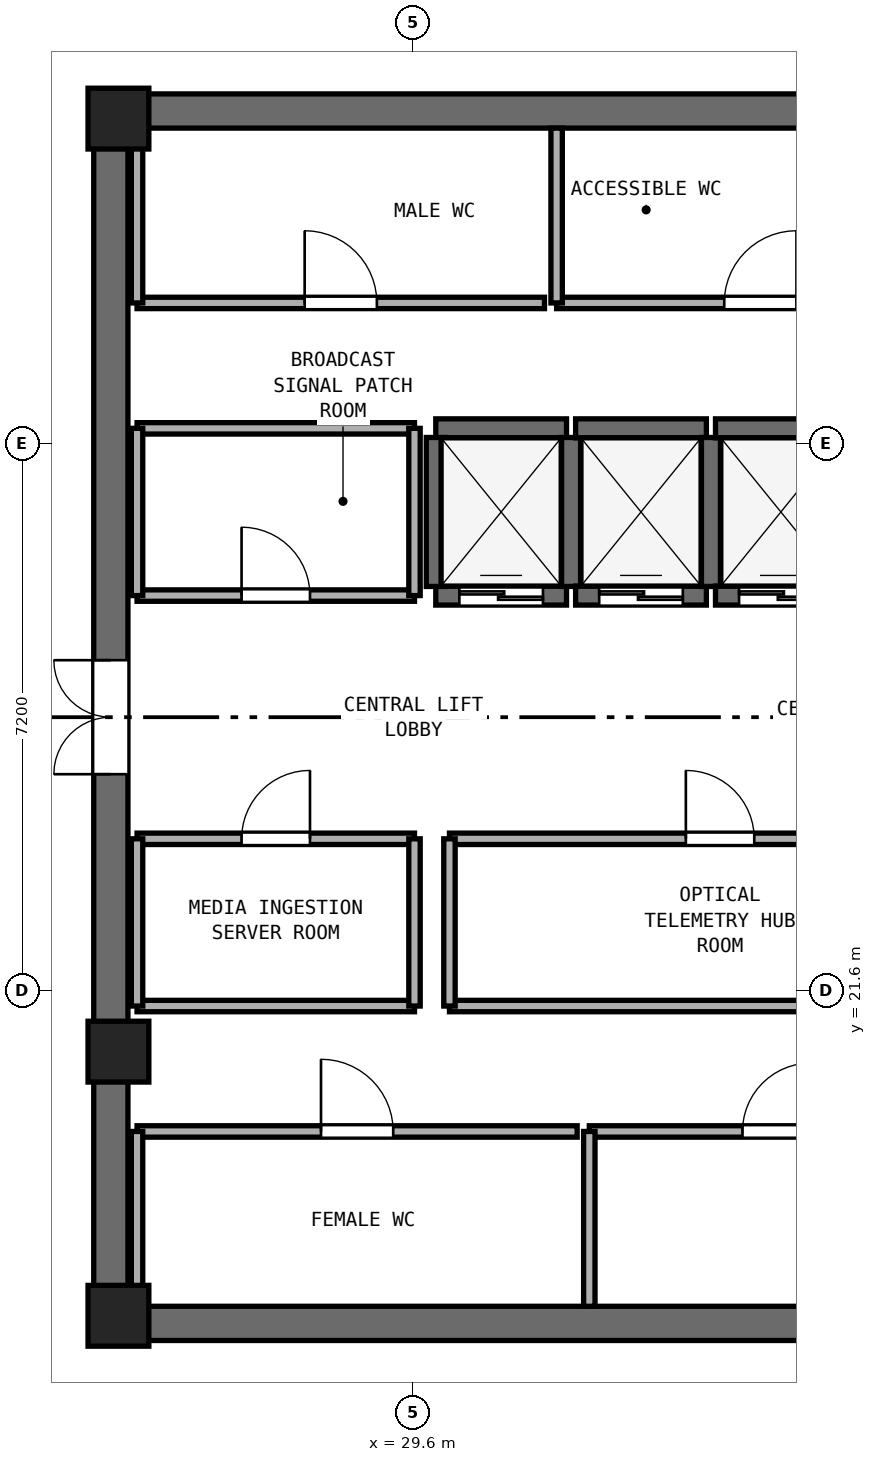
"""IFC4 building model, lengths in metres.
Left out: names, types, materials, properties, quantities, classifications, styles, units other than length and angle.
Written with IfcOpenShell. Run it as: python <this file> out.ifc"""

import sys

from ifc_helpers import new_model, si_unit, direction, frame, frame_2d, origin, origin_2d, place, context, subcontext, project, spatial, rectangle, extrude, element, fill, save


model = new_model("IFC4")
c1 = context("Model", 3, precision=1e-05, world=origin(), true_north=direction((0.0, 1.0)))
c2 = subcontext(c1, "Body", "Model", "MODEL_VIEW")
j1 = project(units=[si_unit("LENGTHUNIT", "METRE"), si_unit("PLANEANGLEUNIT", "RADIAN")], contexts=[c1])
p1 = place(None, origin())
s1 = spatial("IfcSite", under=j1, at=p1, CompositionType="ELEMENT")
p2 = place(p1, origin())
s2 = spatial("IfcBuilding", under=s1, at=p2, CompositionType="ELEMENT")
p3 = place(p2, frame((0.0, 0.0, 228.8)))
s3 = spatial("IfcBuildingStorey", under=s2, at=p3, CompositionType="ELEMENT", Elevation=228.8)
for number, where, z_axis, x_axis in (
    (1, (25.4, 17.225, 0.0), (0.0, 0.0, 1.0), (1.0, 0.0, 0.0)),
    (2, (25.4, 33.175, 0.0), (0.0, 0.0, 1.0), (1.0, 0.0, 0.0)),
):
    element("IfcWall", number, at=place(p3, frame(where, z_axis=z_axis, x_axis=x_axis)), inside=s3, PredefinedType="SHEAR", context=c2, shape_type="SweptSolid", body=[
        extrude(rectangle(XDim=23.2, YDim=0.45, at=frame_2d((11.6, 0.0))), origin(), (0.0, 0.0, 1.0), 3.51),
    ])
p4 = place(p3, frame((25.625, 17.45, 0.0), z_axis=(0.0, 0.0, 1.0), x_axis=(0.0, 1.0, 0.0)))
e3 = element("IfcWall", 3, at=p4, inside=s3, PredefinedType="SHEAR", context=c2, shape_type="SweptSolid", body=[
    extrude(rectangle(XDim=15.5, YDim=0.45, at=frame_2d((7.75, 0.0))), origin(), (0.0, 0.0, 1.0), 3.51),
])
p5 = place(p4, frame((7.0, 0.0, 0.0)))
e4 = element("IfcOpeningElement", 4, at=p5, cuts=e3, PredefinedType="OPENING", context=c2, shape_type="SweptSolid", body=[
    extrude(rectangle(XDim=1.5, YDim=2.15, at=frame_2d((0.75, 1.075))), frame((0.0, 0.235, 0.0), z_axis=(0.0, -1.0, 0.0), x_axis=(1.0, 0.0, 0.0)), (0.0, 0.0, 1.0), 0.47),
])
for number, where, z_axis, x_axis in (
    (5, (25.725, 17.325, 0.0), (0.0, 0.0, 1.0), (1.0, 0.0, 0.0)),
    (6, (25.725, 33.075, 0.0), (0.0, 0.0, 1.0), (1.0, 0.0, 0.0)),
    (7, (25.725, 20.8, 0.0), (0.0, 0.0, 1.0), (1.0, 0.0, 0.0)),
):
    element("IfcColumn", number, at=place(p3, frame(where, z_axis=z_axis, x_axis=x_axis)), inside=s3, PredefinedType="PILASTER", context=c2, shape_type="SweptSolid", body=[
        extrude(rectangle(XDim=0.8, YDim=0.8, at=origin_2d()), origin(), (0.0, 0.0, 1.0), 3.8),
    ])
p6 = place(p3, frame((29.9, 26.8, 0.0), z_axis=(0.0, 0.0, 1.0), x_axis=(1.0, 0.0, 0.0)))
e8 = element("IfcWall", 8, at=p6, inside=s3, PredefinedType="SHEAR", context=c2, shape_type="SweptSolid", body=[
    extrude(rectangle(XDim=1.72, YDim=0.25, at=frame_2d((0.86, 0.0))), origin(), (0.0, 0.0, 1.0), 3.51),
])
p7 = place(p6, frame((0.31, 0.0, 0.0)))
e9 = element("IfcOpeningElement", 9, at=p7, cuts=e8, PredefinedType="OPENING", context=c2, shape_type="SweptSolid", body=[
    extrude(rectangle(XDim=1.1, YDim=2.15, at=frame_2d((0.55, 1.075))), frame((0.0, 0.135, 0.0), z_axis=(0.0, -1.0, 0.0), x_axis=(1.0, 0.0, 0.0)), (0.0, 0.0, 1.0), 0.27),
])
p8 = place(p3, frame((29.9, 29.0, 0.0), z_axis=(0.0, 0.0, 1.0), x_axis=(1.0, 0.0, 0.0)))
e10 = element("IfcWall", 10, at=p8, inside=s3, PredefinedType="SHEAR", context=c2, shape_type="SweptSolid", body=[
    extrude(rectangle(XDim=1.72, YDim=0.25, at=frame_2d((0.86, 0.0))), origin(), (0.0, 0.0, 1.0), 3.51),
])
for number, where, z_axis, x_axis in (
    (11, (29.9, 26.92, 0.0), (0.0, 0.0, 1.0), (0.0, 1.0, 0.0)),
    (12, (31.68, 26.92, 0.0), (0.0, 0.0, 1.0), (0.0, 1.0, 0.0)),
):
    element("IfcWall", number, at=place(p3, frame(where, z_axis=z_axis, x_axis=x_axis)), inside=s3, PredefinedType="SHEAR", context=c2, shape_type="SweptSolid", body=[
        extrude(rectangle(XDim=1.96, YDim=0.25, at=frame_2d((0.98, 0.0))), origin(), (0.0, 0.0, 1.0), 3.51),
    ])
p9 = place(p3, frame((31.74, 26.8, 0.0), z_axis=(0.0, 0.0, 1.0), x_axis=(1.0, 0.0, 0.0)))
e13 = element("IfcWall", 13, at=p9, inside=s3, PredefinedType="SHEAR", context=c2, shape_type="SweptSolid", body=[
    extrude(rectangle(XDim=1.72, YDim=0.25, at=frame_2d((0.86, 0.0))), origin(), (0.0, 0.0, 1.0), 3.51),
])
p10 = place(p9, frame((0.31, 0.0, 0.0)))
e14 = element("IfcOpeningElement", 14, at=p10, cuts=e13, PredefinedType="OPENING", context=c2, shape_type="SweptSolid", body=[
    extrude(rectangle(XDim=1.1, YDim=2.15, at=frame_2d((0.55, 1.075))), frame((0.0, 0.135, 0.0), z_axis=(0.0, -1.0, 0.0), x_axis=(1.0, 0.0, 0.0)), (0.0, 0.0, 1.0), 0.27),
])
p11 = place(p3, frame((31.74, 29.0, 0.0), z_axis=(0.0, 0.0, 1.0), x_axis=(1.0, 0.0, 0.0)))
e15 = element("IfcWall", 15, at=p11, inside=s3, PredefinedType="SHEAR", context=c2, shape_type="SweptSolid", body=[
    extrude(rectangle(XDim=1.72, YDim=0.25, at=frame_2d((0.86, 0.0))), origin(), (0.0, 0.0, 1.0), 3.51),
])
p12 = place(p3, frame((33.52, 26.92, 0.0), z_axis=(0.0, 0.0, 1.0), x_axis=(0.0, 1.0, 0.0)))
e16 = element("IfcWall", 16, at=p12, inside=s3, PredefinedType="SHEAR", context=c2, shape_type="SweptSolid", body=[
    extrude(rectangle(XDim=1.96, YDim=0.25, at=frame_2d((0.98, 0.0))), origin(), (0.0, 0.0, 1.0), 3.51),
])
p13 = place(p3, frame((33.58, 26.8, 0.0), z_axis=(0.0, 0.0, 1.0), x_axis=(1.0, 0.0, 0.0)))
e17 = element("IfcWall", 17, at=p13, inside=s3, PredefinedType="SHEAR", context=c2, shape_type="SweptSolid", body=[
    extrude(rectangle(XDim=1.72, YDim=0.25, at=frame_2d((0.86, 0.0))), origin(), (0.0, 0.0, 1.0), 3.51),
])
p14 = place(p13, frame((0.31, 0.0, 0.0)))
e18 = element("IfcOpeningElement", 18, at=p14, cuts=e17, PredefinedType="OPENING", context=c2, shape_type="SweptSolid", body=[
    extrude(rectangle(XDim=1.1, YDim=2.15, at=frame_2d((0.55, 1.075))), frame((0.0, 0.135, 0.0), z_axis=(0.0, -1.0, 0.0), x_axis=(1.0, 0.0, 0.0)), (0.0, 0.0, 1.0), 0.27),
])
p15 = place(p3, frame((33.58, 29.0, 0.0), z_axis=(0.0, 0.0, 1.0), x_axis=(1.0, 0.0, 0.0)))
e19 = element("IfcWall", 19, at=p15, inside=s3, PredefinedType="SHEAR", context=c2, shape_type="SweptSolid", body=[
    extrude(rectangle(XDim=1.72, YDim=0.25, at=frame_2d((0.86, 0.0))), origin(), (0.0, 0.0, 1.0), 3.51),
])
p16 = place(p3, frame((25.97, 30.65, 0.0), z_axis=(0.0, 0.0, 1.0), x_axis=(1.0, 0.0, 0.0)))
e20 = element("IfcWall", 20, at=p16, inside=s3, PredefinedType="PARTITIONING", context=c2, shape_type="SweptSolid", body=[
    extrude(rectangle(XDim=5.36, YDim=0.15, at=frame_2d((2.68, 0.0))), origin(), (0.0, 0.0, 1.0), 3.51),
])
p17 = place(p16, frame((2.205, 0.0, 0.0)))
e21 = element("IfcOpeningElement", 21, at=p17, cuts=e20, PredefinedType="OPENING", context=c2, shape_type="SweptSolid", body=[
    extrude(rectangle(XDim=0.95, YDim=2.1, at=frame_2d((0.475, 1.05))), frame((0.0, 0.085, 0.0), z_axis=(0.0, -1.0, 0.0), x_axis=(1.0, 0.0, 0.0)), (0.0, 0.0, 1.0), 0.17),
])
p18 = place(p3, frame((25.97, 30.65, 0.0), z_axis=(0.0, 0.0, 1.0), x_axis=(0.0, 1.0, 0.0)))
e22 = element("IfcWall", 22, at=p18, inside=s3, PredefinedType="PARTITIONING", context=c2, shape_type="SweptSolid", body=[
    extrude(rectangle(XDim=2.3, YDim=0.15, at=frame_2d((1.15, 0.0))), origin(), (0.0, 0.0, 1.0), 2.61),
])
p19 = place(p3, frame((31.49, 30.65, 0.0), z_axis=(0.0, 0.0, 1.0), x_axis=(1.0, 0.0, 0.0)))
e23 = element("IfcWall", 23, at=p19, inside=s3, PredefinedType="PARTITIONING", context=c2, shape_type="SweptSolid", body=[
    extrude(rectangle(XDim=5.36, YDim=0.15, at=frame_2d((2.68, 0.0))), origin(), (0.0, 0.0, 1.0), 3.51),
])
p20 = place(p19, frame((2.205, 0.0, 0.0)))
e24 = element("IfcOpeningElement", 24, at=p20, cuts=e23, PredefinedType="OPENING", context=c2, shape_type="SweptSolid", body=[
    extrude(rectangle(XDim=0.95, YDim=2.1, at=frame_2d((0.475, 1.05))), frame((0.0, 0.085, 0.0), z_axis=(0.0, -1.0, 0.0), x_axis=(1.0, 0.0, 0.0)), (0.0, 0.0, 1.0), 0.17),
])
p21 = place(p3, frame((31.49, 30.65, 0.0), z_axis=(0.0, 0.0, 1.0), x_axis=(0.0, 1.0, 0.0)))
e25 = element("IfcWall", 25, at=p21, inside=s3, PredefinedType="PARTITIONING", context=c2, shape_type="SweptSolid", body=[
    extrude(rectangle(XDim=2.3, YDim=0.15, at=frame_2d((1.15, 0.0))), origin(), (0.0, 0.0, 1.0), 3.51),
])
p22 = place(p3, frame((25.97, 19.75, 0.0), z_axis=(0.0, 0.0, 1.0), x_axis=(1.0, 0.0, 0.0)))
e26 = element("IfcWall", 26, at=p22, inside=s3, PredefinedType="PARTITIONING", context=c2, shape_type="SweptSolid", body=[
    extrude(rectangle(XDim=5.79, YDim=0.15, at=frame_2d((2.895, 0.0))), origin(), (0.0, 0.0, 1.0), 3.51),
])
p23 = place(p22, frame((2.42, 0.0, 0.0)))
e27 = element("IfcOpeningElement", 27, at=p23, cuts=e26, PredefinedType="OPENING", context=c2, shape_type="SweptSolid", body=[
    extrude(rectangle(XDim=0.95, YDim=2.1, at=frame_2d((0.475, 1.05))), frame((0.0, 0.085, 0.0), z_axis=(0.0, -1.0, 0.0), x_axis=(1.0, 0.0, 0.0)), (0.0, 0.0, 1.0), 0.17),
])
p24 = place(p3, frame((25.97, 17.45, 0.0), z_axis=(0.0, 0.0, 1.0), x_axis=(0.0, 1.0, 0.0)))
e28 = element("IfcWall", 28, at=p24, inside=s3, PredefinedType="PARTITIONING", context=c2, shape_type="SweptSolid", body=[
    extrude(rectangle(XDim=2.3, YDim=0.15, at=frame_2d((1.15, 0.0))), origin(), (0.0, 0.0, 1.0), 2.61),
])
p25 = place(p3, frame((31.92, 19.75, 0.0), z_axis=(0.0, 0.0, 1.0), x_axis=(1.0, 0.0, 0.0)))
e29 = element("IfcWall", 29, at=p25, inside=s3, PredefinedType="PARTITIONING", context=c2, shape_type="SweptSolid", body=[
    extrude(rectangle(XDim=4.93, YDim=0.15, at=frame_2d((2.465, 0.0))), origin(), (0.0, 0.0, 1.0), 3.51),
])
p26 = place(p25, frame((2.015, 0.0, 0.0)))
e30 = element("IfcOpeningElement", 30, at=p26, cuts=e29, PredefinedType="OPENING", context=c2, shape_type="SweptSolid", body=[
    extrude(rectangle(XDim=0.9, YDim=2.1, at=frame_2d((0.45, 1.05))), frame((0.0, 0.085, 0.0), z_axis=(0.0, -1.0, 0.0), x_axis=(1.0, 0.0, 0.0)), (0.0, 0.0, 1.0), 0.17),
])
p27 = place(p3, frame((31.92, 17.45, 0.0), z_axis=(0.0, 0.0, 1.0), x_axis=(0.0, 1.0, 0.0)))
e31 = element("IfcWall", 31, at=p27, inside=s3, PredefinedType="PARTITIONING", context=c2, shape_type="SweptSolid", body=[
    extrude(rectangle(XDim=2.3, YDim=0.15, at=frame_2d((1.15, 0.0))), origin(), (0.0, 0.0, 1.0), 3.51),
])
p28 = place(p3, frame((25.97, 26.8, 0.0), z_axis=(0.0, 0.0, 1.0), x_axis=(1.0, 0.0, 0.0)))
e32 = element("IfcWall", 32, at=p28, inside=s3, PredefinedType="PARTITIONING", context=c2, shape_type="SweptSolid", body=[
    extrude(rectangle(XDim=3.65, YDim=0.15, at=frame_2d((1.825, 0.0))), origin(), (0.0, 0.0, 1.0), 3.51),
])
p29 = place(p28, frame((1.375, 0.0, 0.0)))
e33 = element("IfcOpeningElement", 33, at=p29, cuts=e32, PredefinedType="OPENING", context=c2, shape_type="SweptSolid", body=[
    extrude(rectangle(XDim=0.9, YDim=2.1, at=frame_2d((0.45, 1.05))), frame((0.0, 0.085, 0.0), z_axis=(0.0, -1.0, 0.0), x_axis=(1.0, 0.0, 0.0)), (0.0, 0.0, 1.0), 0.17),
])
p30 = place(p3, frame((25.97, 29.0, 0.0), z_axis=(0.0, 0.0, 1.0), x_axis=(1.0, 0.0, 0.0)))
e34 = element("IfcWall", 34, at=p30, inside=s3, PredefinedType="PARTITIONING", context=c2, shape_type="SweptSolid", body=[
    extrude(rectangle(XDim=3.65, YDim=0.15, at=frame_2d((1.825, 0.0))), origin(), (0.0, 0.0, 1.0), 3.51),
])
p31 = place(p3, frame((25.97, 26.8, 0.0), z_axis=(0.0, 0.0, 1.0), x_axis=(0.0, 1.0, 0.0)))
e35 = element("IfcWall", 35, at=p31, inside=s3, PredefinedType="PARTITIONING", context=c2, shape_type="SweptSolid", body=[
    extrude(rectangle(XDim=2.2, YDim=0.15, at=frame_2d((1.1, 0.0))), origin(), (0.0, 0.0, 1.0), 2.61),
])
p32 = place(p3, frame((29.62, 26.8, 0.0), z_axis=(0.0, 0.0, 1.0), x_axis=(0.0, 1.0, 0.0)))
e36 = element("IfcWall", 36, at=p32, inside=s3, PredefinedType="PARTITIONING", context=c2, shape_type="SweptSolid", body=[
    extrude(rectangle(XDim=2.2, YDim=0.15, at=frame_2d((1.1, 0.0))), origin(), (0.0, 0.0, 1.0), 3.51),
])
p33 = place(p3, frame((25.97, 21.4, 0.0), z_axis=(0.0, 0.0, 1.0), x_axis=(1.0, 0.0, 0.0)))
e37 = element("IfcWall", 37, at=p33, inside=s3, PredefinedType="PARTITIONING", context=c2, shape_type="SweptSolid", body=[
    extrude(rectangle(XDim=3.65, YDim=0.15, at=frame_2d((1.825, 0.0))), origin(), (0.0, 0.0, 1.0), 3.51),
])
p34 = place(p3, frame((25.97, 23.6, 0.0), z_axis=(0.0, 0.0, 1.0), x_axis=(1.0, 0.0, 0.0)))
e38 = element("IfcWall", 38, at=p34, inside=s3, PredefinedType="PARTITIONING", context=c2, shape_type="SweptSolid", body=[
    extrude(rectangle(XDim=3.65, YDim=0.15, at=frame_2d((1.825, 0.0))), origin(), (0.0, 0.0, 1.0), 3.51),
])
p35 = place(p34, frame((1.375, 0.0, 0.0)))
e39 = element("IfcOpeningElement", 39, at=p35, cuts=e38, PredefinedType="OPENING", context=c2, shape_type="SweptSolid", body=[
    extrude(rectangle(XDim=0.9, YDim=2.1, at=frame_2d((0.45, 1.05))), frame((0.0, 0.085, 0.0), z_axis=(0.0, -1.0, 0.0), x_axis=(1.0, 0.0, 0.0)), (0.0, 0.0, 1.0), 0.17),
])
p36 = place(p3, frame((25.97, 21.4, 0.0), z_axis=(0.0, 0.0, 1.0), x_axis=(0.0, 1.0, 0.0)))
e40 = element("IfcWall", 40, at=p36, inside=s3, PredefinedType="PARTITIONING", context=c2, shape_type="SweptSolid", body=[
    extrude(rectangle(XDim=2.2, YDim=0.15, at=frame_2d((1.1, 0.0))), origin(), (0.0, 0.0, 1.0), 2.61),
])
p37 = place(p3, frame((29.62, 21.4, 0.0), z_axis=(0.0, 0.0, 1.0), x_axis=(0.0, 1.0, 0.0)))
e41 = element("IfcWall", 41, at=p37, inside=s3, PredefinedType="PARTITIONING", context=c2, shape_type="SweptSolid", body=[
    extrude(rectangle(XDim=2.2, YDim=0.15, at=frame_2d((1.1, 0.0))), origin(), (0.0, 0.0, 1.0), 3.51),
])
p38 = place(p3, frame((30.08, 21.4, 0.0), z_axis=(0.0, 0.0, 1.0), x_axis=(1.0, 0.0, 0.0)))
e42 = element("IfcWall", 42, at=p38, inside=s3, PredefinedType="PARTITIONING", context=c2, shape_type="SweptSolid", body=[
    extrude(rectangle(XDim=7.12, YDim=0.15, at=frame_2d((3.56, 0.0))), origin(), (0.0, 0.0, 1.0), 3.51),
])
p39 = place(p3, frame((30.08, 23.6, 0.0), z_axis=(0.0, 0.0, 1.0), x_axis=(1.0, 0.0, 0.0)))
e43 = element("IfcWall", 43, at=p39, inside=s3, PredefinedType="PARTITIONING", context=c2, shape_type="SweptSolid", body=[
    extrude(rectangle(XDim=7.12, YDim=0.15, at=frame_2d((3.56, 0.0))), origin(), (0.0, 0.0, 1.0), 3.51),
])
p40 = place(p39, frame((3.11, 0.0, 0.0)))
e44 = element("IfcOpeningElement", 44, at=p40, cuts=e43, PredefinedType="OPENING", context=c2, shape_type="SweptSolid", body=[
    extrude(rectangle(XDim=0.9, YDim=2.1, at=frame_2d((0.45, 1.05))), frame((0.0, 0.085, 0.0), z_axis=(0.0, -1.0, 0.0), x_axis=(1.0, 0.0, 0.0)), (0.0, 0.0, 1.0), 0.17),
])
p41 = place(p3, frame((30.08, 21.4, 0.0), z_axis=(0.0, 0.0, 1.0), x_axis=(0.0, 1.0, 0.0)))
e45 = element("IfcWall", 45, at=p41, inside=s3, PredefinedType="PARTITIONING", context=c2, shape_type="SweptSolid", body=[
    extrude(rectangle(XDim=2.2, YDim=0.15, at=frame_2d((1.1, 0.0))), origin(), (0.0, 0.0, 1.0), 3.51),
])
p42 = place(p7, origin())
e46 = element("IfcDoor", 46, at=p42, inside=s3, OperationType="DOUBLE_DOOR_SLIDING", PredefinedType="DOOR", context=c2, shape_type="SweptSolid", body=[
    extrude(rectangle(XDim=1.1, YDim=2.15, at=frame_2d((0.55, 1.075))), frame((0.0, 0.025, 0.0), z_axis=(0.0, -1.0, 0.0), x_axis=(1.0, 0.0, 0.0)), (0.0, 0.0, 1.0), 0.05),
])
fill(e9, e46)
p43 = place(p10, origin())
e47 = element("IfcDoor", 47, at=p43, inside=s3, OperationType="DOUBLE_DOOR_SLIDING", PredefinedType="DOOR", context=c2, shape_type="SweptSolid", body=[
    extrude(rectangle(XDim=1.1, YDim=2.15, at=frame_2d((0.55, 1.075))), frame((0.0, 0.025, 0.0), z_axis=(0.0, -1.0, 0.0), x_axis=(1.0, 0.0, 0.0)), (0.0, 0.0, 1.0), 0.05),
])
fill(e14, e47)
p44 = place(p14, origin())
e48 = element("IfcDoor", 48, at=p44, inside=s3, OperationType="DOUBLE_DOOR_SLIDING", PredefinedType="DOOR", context=c2, shape_type="SweptSolid", body=[
    extrude(rectangle(XDim=1.1, YDim=2.15, at=frame_2d((0.55, 1.075))), frame((0.0, 0.025, 0.0), z_axis=(0.0, -1.0, 0.0), x_axis=(1.0, 0.0, 0.0)), (0.0, 0.0, 1.0), 0.05),
])
fill(e18, e48)
p45 = place(p5, origin())
e49 = element("IfcDoor", 49, at=p45, inside=s3, OperationType="DOUBLE_DOOR_SINGLE_SWING", PredefinedType="DOOR", context=c2, shape_type="SweptSolid", body=[
    extrude(rectangle(XDim=1.5, YDim=2.15, at=frame_2d((0.75, 1.075))), frame((0.0, 0.025, 0.0), z_axis=(0.0, -1.0, 0.0), x_axis=(1.0, 0.0, 0.0)), (0.0, 0.0, 1.0), 0.05),
])
fill(e4, e49)
p46 = place(p17, origin())
e50 = element("IfcDoor", 50, at=p46, inside=s3, OperationType="SINGLE_SWING_LEFT", PredefinedType="DOOR", context=c2, shape_type="SweptSolid", body=[
    extrude(rectangle(XDim=0.95, YDim=2.1, at=frame_2d((0.475, 1.05))), frame((0.0, 0.025, 0.0), z_axis=(0.0, -1.0, 0.0), x_axis=(1.0, 0.0, 0.0)), (0.0, 0.0, 1.0), 0.05),
])
fill(e21, e50)
p47 = place(p20, origin())
e51 = element("IfcDoor", 51, at=p47, inside=s3, OperationType="SINGLE_SWING_RIGHT", PredefinedType="DOOR", context=c2, shape_type="SweptSolid", body=[
    extrude(rectangle(XDim=0.95, YDim=2.1, at=frame_2d((0.475, 1.05))), frame((0.0, 0.025, 0.0), z_axis=(0.0, -1.0, 0.0), x_axis=(1.0, 0.0, 0.0)), (0.0, 0.0, 1.0), 0.05),
])
fill(e24, e51)
p48 = place(p23, origin())
e52 = element("IfcDoor", 52, at=p48, inside=s3, OperationType="SINGLE_SWING_LEFT", PredefinedType="DOOR", context=c2, shape_type="SweptSolid", body=[
    extrude(rectangle(XDim=0.95, YDim=2.1, at=frame_2d((0.475, 1.05))), frame((0.0, 0.025, 0.0), z_axis=(0.0, -1.0, 0.0), x_axis=(1.0, 0.0, 0.0)), (0.0, 0.0, 1.0), 0.05),
])
fill(e27, e52)
p49 = place(p26, origin())
e53 = element("IfcDoor", 53, at=p49, inside=s3, OperationType="SINGLE_SWING_RIGHT", PredefinedType="DOOR", context=c2, shape_type="SweptSolid", body=[
    extrude(rectangle(XDim=0.9, YDim=2.1, at=frame_2d((0.45, 1.05))), frame((0.0, 0.025, 0.0), z_axis=(0.0, -1.0, 0.0), x_axis=(1.0, 0.0, 0.0)), (0.0, 0.0, 1.0), 0.05),
])
fill(e30, e53)
p50 = place(p29, origin())
e54 = element("IfcDoor", 54, at=p50, inside=s3, OperationType="SINGLE_SWING_LEFT", PredefinedType="DOOR", context=c2, shape_type="SweptSolid", body=[
    extrude(rectangle(XDim=0.9, YDim=2.1, at=frame_2d((0.45, 1.05))), frame((0.0, 0.025, 0.0), z_axis=(0.0, -1.0, 0.0), x_axis=(1.0, 0.0, 0.0)), (0.0, 0.0, 1.0), 0.05),
])
fill(e33, e54)
p51 = place(p35, origin())
e55 = element("IfcDoor", 55, at=p51, inside=s3, OperationType="SINGLE_SWING_RIGHT", PredefinedType="DOOR", context=c2, shape_type="SweptSolid", body=[
    extrude(rectangle(XDim=0.9, YDim=2.1, at=frame_2d((0.45, 1.05))), frame((0.0, 0.025, 0.0), z_axis=(0.0, -1.0, 0.0), x_axis=(1.0, 0.0, 0.0)), (0.0, 0.0, 1.0), 0.05),
])
fill(e39, e55)
p52 = place(p40, origin())
e56 = element("IfcDoor", 56, at=p52, inside=s3, OperationType="SINGLE_SWING_LEFT", PredefinedType="DOOR", context=c2, shape_type="SweptSolid", body=[
    extrude(rectangle(XDim=0.9, YDim=2.1, at=frame_2d((0.45, 1.05))), frame((0.0, 0.025, 0.0), z_axis=(0.0, -1.0, 0.0), x_axis=(1.0, 0.0, 0.0)), (0.0, 0.0, 1.0), 0.05),
])
fill(e44, e56)
save(model, sys.argv[1])
